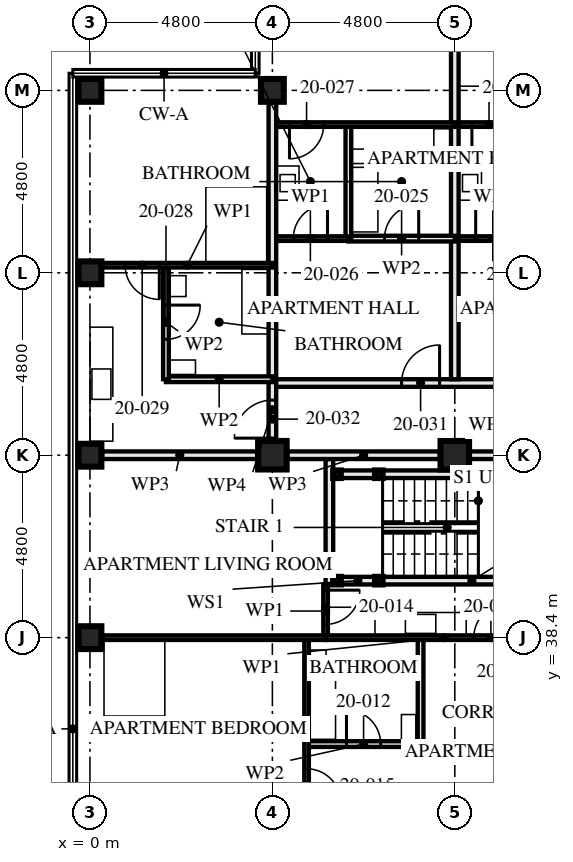
"""IFC4 building model, lengths in metres.
Left out: names, types, materials, properties, quantities, classifications, styles, units other than length and angle.
Written with IfcOpenShell. Run it as: python <this file> out.ifc"""

import sys

from ifc_helpers import new_model, si_unit, direction, frame, frame_2d, origin, origin_2d, place, context, subcontext, project, spatial, rectangle, hollow_rectangle, extrude, element, fill, save


model = new_model("IFC4")
c1 = context("Model", 3, precision=1e-05, world=origin(), true_north=direction((0.0, 1.0)))
c2 = subcontext(c1, "Body", "Model", "MODEL_VIEW")
j1 = project(units=[si_unit("LENGTHUNIT", "METRE"), si_unit("PLANEANGLEUNIT", "RADIAN")], contexts=[c1])
p1 = place(None, origin())
s1 = spatial("IfcSite", under=j1, at=p1, CompositionType="ELEMENT")
p2 = place(p1, origin())
s2 = spatial("IfcBuilding", under=s1, at=p2, CompositionType="ELEMENT")
p3 = place(p2, frame((0.0, 0.0, 76.0)))
s3 = spatial("IfcBuildingStorey", under=s2, at=p3, CompositionType="ELEMENT", Elevation=76.0)
for number, where, z_axis, x_axis in (
    (1, (0.0, 38.4, 0.0), (0.0, 0.0, 1.0), (1.0, 0.0, 0.0)),
    (2, (0.0, 43.2, 0.0), (0.0, 0.0, 1.0), (0.0, 1.0, 0.0)),
    (3, (0.0, 48.0, 0.0), (0.0, 0.0, 1.0), (1.0, 0.0, 0.0)),
    (4, (0.0, 52.8, 0.0), (0.0, 0.0, 1.0), (0.0, 1.0, 0.0)),
):
    element("IfcColumn", number, at=place(p3, frame(where, z_axis=z_axis, x_axis=x_axis)), inside=s3, PredefinedType="COLUMN", context=c2, shape_type="SweptSolid", body=[
        extrude(hollow_rectangle(XDim=0.6, YDim=0.6, WallThickness=0.08, at=origin_2d()), origin(), (0.0, 0.0, 1.0), 3.5),
    ])
p4 = place(p3, frame((4.8, 43.2, 0.0), z_axis=(0.0, 0.0, 1.0), x_axis=(0.0, 1.0, 0.0)))
e5 = element("IfcColumn", 5, at=p4, inside=s3, PredefinedType="COLUMN", context=c2, shape_type="SweptSolid", body=[
    extrude(hollow_rectangle(XDim=0.75, YDim=0.75, WallThickness=0.08, at=origin_2d()), origin(), (0.0, 0.0, 1.0), 3.5),
])
p5 = place(p3, frame((4.8, 52.8, 0.0), z_axis=(0.0, 0.0, 1.0), x_axis=(0.0, 1.0, 0.0)))
e6 = element("IfcColumn", 6, at=p5, inside=s3, PredefinedType="COLUMN", context=c2, shape_type="SweptSolid", body=[
    extrude(hollow_rectangle(XDim=0.6, YDim=0.6, WallThickness=0.08, at=origin_2d()), origin(), (0.0, 0.0, 1.0), 3.5),
])
p6 = place(p3, frame((9.6, 43.2, 0.0), z_axis=(0.0, 0.0, 1.0), x_axis=(0.0, 1.0, 0.0)))
e7 = element("IfcColumn", 7, at=p6, inside=s3, PredefinedType="COLUMN", context=c2, shape_type="SweptSolid", body=[
    extrude(hollow_rectangle(XDim=0.75, YDim=0.75, WallThickness=0.08, at=origin_2d()), origin(), (0.0, 0.0, 1.0), 3.5),
])
for number, where, z_axis, x_axis in (
    (8, (6.5, 42.7, 0.0), (0.0, 0.0, 1.0), (1.0, 0.0, 0.0)),
    (9, (6.5, 39.9, 0.0), (0.0, 0.0, 1.0), (1.0, 0.0, 0.0)),
    (10, (7.6, 42.7, 0.0), (0.0, 0.0, 1.0), (1.0, 0.0, 0.0)),
    (11, (7.6, 39.9, 0.0), (0.0, 0.0, 1.0), (1.0, 0.0, 0.0)),
):
    element("IfcColumn", number, at=place(p3, frame(where, z_axis=z_axis, x_axis=x_axis)), inside=s3, PredefinedType="COLUMN", context=c2, shape_type="SweptSolid", body=[
        extrude(hollow_rectangle(XDim=0.2, YDim=0.2, WallThickness=0.008, at=origin_2d()), origin(), (0.0, 0.0, 1.0), 3.25),
    ])
p7 = place(p3, frame((6.6, 42.7, 0.0), z_axis=(0.0, 0.0, 1.0), x_axis=(1.0, 0.0, 0.0)))
e12 = element("IfcWall", 12, at=p7, inside=s3, PredefinedType="SOLIDWALL", context=c2, shape_type="SweptSolid", body=[
    extrude(rectangle(XDim=0.9, YDim=0.2, at=frame_2d((0.45, 0.0))), origin(), (0.0, 0.0, 1.0), 2.94),
])
p8 = place(p3, frame((7.7, 42.7, 0.0), z_axis=(0.0, 0.0, 1.0), x_axis=(1.0, 0.0, 0.0)))
e13 = element("IfcWall", 13, at=p8, inside=s3, PredefinedType="SOLIDWALL", context=c2, shape_type="SweptSolid", body=[
    extrude(rectangle(XDim=4.7, YDim=0.2, at=frame_2d((2.35, 0.0))), origin(), (0.0, 0.0, 1.0), 2.94),
])
p9 = place(p3, frame((6.6, 39.9, 0.0), z_axis=(0.0, 0.0, 1.0), x_axis=(1.0, 0.0, 0.0)))
e14 = element("IfcWall", 14, at=p9, inside=s3, PredefinedType="SOLIDWALL", context=c2, shape_type="SweptSolid", body=[
    extrude(rectangle(XDim=0.9, YDim=0.2, at=frame_2d((0.45, 0.0))), origin(), (0.0, 0.0, 1.0), 2.94),
])
p10 = place(p3, frame((7.7, 39.9, 0.0), z_axis=(0.0, 0.0, 1.0), x_axis=(1.0, 0.0, 0.0)))
e15 = element("IfcWall", 15, at=p10, inside=s3, PredefinedType="SOLIDWALL", context=c2, shape_type="SweptSolid", body=[
    extrude(rectangle(XDim=4.7, YDim=0.2, at=frame_2d((2.35, 0.0))), origin(), (0.0, 0.0, 1.0), 2.94),
])
p11 = place(p3, frame((6.3, 43.1, 0.0), z_axis=(0.0, 0.0, 1.0), x_axis=(0.0, -1.0, 0.0)))
e16 = element("IfcWall", 16, at=p11, inside=s3, PredefinedType="SOLIDWALL", context=c2, shape_type="SweptSolid", body=[
    extrude(rectangle(XDim=3.3, YDim=0.2, at=frame_2d((1.65, 0.0))), origin(), (0.0, 0.0, 1.0), 3.25),
])
p12 = place(p3, frame((5.7, 35.6, 0.0), z_axis=(0.0, 0.0, 1.0), x_axis=(1.0, 0.0, 0.0)))
e17 = element("IfcWall", 17, at=p12, inside=s3, PredefinedType="PARTITIONING", context=c2, shape_type="SweptSolid", body=[
    extrude(rectangle(XDim=3.0, YDim=0.15, at=frame_2d((1.5, 0.0))), origin(), (0.0, 0.0, 1.0), 3.25),
])
p13 = place(p12, frame((1.05, 0.0, 0.0)))
e18 = element("IfcOpeningElement", 18, at=p13, cuts=e17, PredefinedType="OPENING", context=c2, shape_type="SweptSolid", body=[
    extrude(rectangle(XDim=0.9, YDim=2.1, at=frame_2d((0.45, 1.05))), frame((0.0, 0.085, 0.0), z_axis=(0.0, -1.0, 0.0), x_axis=(1.0, 0.0, 0.0)), (0.0, 0.0, 1.0), 0.171),
])
p14 = place(p3, frame((8.7, 38.4, 0.0), z_axis=(0.0, 0.0, 1.0), x_axis=(0.0, -1.0, 0.0)))
e19 = element("IfcWall", 19, at=p14, inside=s3, PredefinedType="PARTITIONING", context=c2, shape_type="SweptSolid", body=[
    extrude(rectangle(XDim=2.8, YDim=0.15, at=frame_2d((1.4, 0.0))), origin(), (0.0, 0.0, 1.0), 3.25),
])
p15 = place(p3, frame((6.2, 38.4, 0.0), z_axis=(0.0, 0.0, 1.0), x_axis=(1.0, 0.0, 0.0)))
e20 = element("IfcWall", 20, at=p15, inside=s3, PredefinedType="PARTITIONING", context=c2, shape_type="SweptSolid", body=[
    extrude(rectangle(XDim=6.25, YDim=0.12, at=frame_2d((3.125, 0.0))), origin(), (0.0, 0.0, 1.0), 2.04),
])
p16 = place(p15, frame((3.9, 0.0, 0.0)))
e21 = element("IfcOpeningElement", 21, at=p16, cuts=e20, PredefinedType="OPENING", context=c2, shape_type="SweptSolid", body=[
    extrude(rectangle(XDim=0.9, YDim=2.0, at=frame_2d((0.45, 1.0))), frame((0.0, 0.071, 0.0), z_axis=(0.0, -1.0, 0.0), x_axis=(1.0, 0.0, 0.0)), (0.0, 0.0, 1.0), 0.141),
])
p17 = place(p3, frame((6.2, 39.8, 0.0), z_axis=(0.0, 0.0, 1.0), x_axis=(0.0, -1.0, 0.0)))
e22 = element("IfcWall", 22, at=p17, inside=s3, PredefinedType="PARTITIONING", context=c2, shape_type="SweptSolid", body=[
    extrude(rectangle(XDim=1.4, YDim=0.12, at=frame_2d((0.7, 0.0))), origin(), (0.0, 0.0, 1.0), 3.25),
])
p18 = place(p17, frame((0.15, 0.0, 0.0)))
e23 = element("IfcOpeningElement", 23, at=p18, cuts=e22, PredefinedType="OPENING", context=c2, shape_type="SweptSolid", body=[
    extrude(rectangle(XDim=0.9, YDim=2.1, at=frame_2d((0.45, 1.05))), frame((0.0, 0.071, 0.0), z_axis=(0.0, -1.0, 0.0), x_axis=(1.0, 0.0, 0.0)), (0.0, 0.0, 1.0), 0.141),
])
p19 = place(p3, frame((5.7, 38.4, 0.0), z_axis=(0.0, 0.0, 1.0), x_axis=(0.0, -1.0, 0.0)))
e24 = element("IfcWall", 24, at=p19, inside=s3, PredefinedType="PARTITIONING", context=c2, shape_type="SweptSolid", body=[
    extrude(rectangle(XDim=4.8, YDim=0.12, at=frame_2d((2.4, 0.0))), origin(), (0.0, 0.0, 1.0), 3.25),
])
p20 = place(p19, frame((3.45, 0.0, 0.0)))
e25 = element("IfcOpeningElement", 25, at=p20, cuts=e24, PredefinedType="OPENING", context=c2, shape_type="SweptSolid", body=[
    extrude(rectangle(XDim=0.9, YDim=2.1, at=frame_2d((0.45, 1.05))), frame((0.0, 0.071, 0.0), z_axis=(0.0, -1.0, 0.0), x_axis=(1.0, 0.0, 0.0)), (0.0, 0.0, 1.0), 0.141),
])
p21 = place(p3, frame((0.32, 38.4, 0.0), z_axis=(0.0, 0.0, 1.0), x_axis=(1.0, 0.0, 0.0)))
e26 = element("IfcWall", 26, at=p21, inside=s3, PredefinedType="PARTITIONING", context=c2, shape_type="SweptSolid", body=[
    extrude(rectangle(XDim=5.88, YDim=0.12, at=frame_2d((2.94, 0.0))), origin(), (0.0, 0.0, 1.0), 2.04),
])
p22 = place(p3, frame((11.6, 48.9, 0.0), z_axis=(0.0, 0.0, 1.0), x_axis=(-1.0, 0.0, 0.0)))
e27 = element("IfcWall", 27, at=p22, inside=s3, PredefinedType="PARTITIONING", context=c2, shape_type="SweptSolid", body=[
    extrude(rectangle(XDim=2.0, YDim=0.12, at=frame_2d((1.0, 0.0))), origin(), (0.0, 0.0, 1.0), 3.25),
])
p23 = place(p22, frame((0.55, 0.0, 0.0)))
e28 = element("IfcOpeningElement", 28, at=p23, cuts=e27, PredefinedType="OPENING", context=c2, shape_type="SweptSolid", body=[
    extrude(rectangle(XDim=0.9, YDim=2.1, at=frame_2d((0.45, 1.05))), frame((0.0, 0.071, 0.0), z_axis=(0.0, -1.0, 0.0), x_axis=(1.0, 0.0, 0.0)), (0.0, 0.0, 1.0), 0.141),
])
p24 = place(p3, frame((14.4, 51.9, 0.0), z_axis=(0.0, 0.0, 1.0), x_axis=(-1.0, 0.0, 0.0)))
e29 = element("IfcWall", 29, at=p24, inside=s3, PredefinedType="PARTITIONING", context=c2, shape_type="SweptSolid", body=[
    extrude(rectangle(XDim=4.8, YDim=0.12, at=frame_2d((2.4, 0.0))), origin(), (0.0, 0.0, 1.0), 3.25),
])
p25 = place(p24, frame((3.45, 0.0, 0.0)))
e30 = element("IfcOpeningElement", 30, at=p25, cuts=e29, PredefinedType="OPENING", context=c2, shape_type="SweptSolid", body=[
    extrude(rectangle(XDim=0.9, YDim=2.1, at=frame_2d((0.45, 1.05))), frame((0.0, 0.071, 0.0), z_axis=(0.0, -1.0, 0.0), x_axis=(1.0, 0.0, 0.0)), (0.0, 0.0, 1.0), 0.141),
])
p26 = place(p3, frame((9.6, 57.28, 0.0), z_axis=(0.0, 0.0, 1.0), x_axis=(0.0, -1.0, 0.0)))
e31 = element("IfcWall", 31, at=p26, inside=s3, PredefinedType="PARTITIONING", context=c2, shape_type="SweptSolid", body=[
    extrude(rectangle(XDim=12.08, YDim=0.2, at=frame_2d((6.04, 0.0))), origin(), (0.0, 0.0, 1.0), 2.04),
])
p27 = place(p3, frame((6.8, 51.9, 0.0), z_axis=(0.0, 0.0, 1.0), x_axis=(0.0, -1.0, 0.0)))
e32 = element("IfcWall", 32, at=p27, inside=s3, PredefinedType="PARTITIONING", context=c2, shape_type="SweptSolid", body=[
    extrude(rectangle(XDim=3.0, YDim=0.15, at=frame_2d((1.5, 0.0))), origin(), (0.0, 0.0, 1.0), 3.25),
])
p28 = place(p3, frame((9.6, 48.9, 0.0), z_axis=(0.0, 0.0, 1.0), x_axis=(-1.0, 0.0, 0.0)))
e33 = element("IfcWall", 33, at=p28, inside=s3, PredefinedType="PARTITIONING", context=c2, shape_type="SweptSolid", body=[
    extrude(rectangle(XDim=2.8, YDim=0.15, at=frame_2d((1.4, 0.0))), origin(), (0.0, 0.0, 1.0), 3.25),
])
p29 = place(p28, frame((0.95, 0.0, 0.0)))
e34 = element("IfcOpeningElement", 34, at=p29, cuts=e33, PredefinedType="OPENING", context=c2, shape_type="SweptSolid", body=[
    extrude(rectangle(XDim=0.9, YDim=2.1, at=frame_2d((0.45, 1.05))), frame((0.0, 0.085, 0.0), z_axis=(0.0, -1.0, 0.0), x_axis=(1.0, 0.0, 0.0)), (0.0, 0.0, 1.0), 0.171),
])
p30 = place(p3, frame((6.8, 48.9, 0.0), z_axis=(0.0, 0.0, 1.0), x_axis=(-1.0, 0.0, 0.0)))
e35 = element("IfcWall", 35, at=p30, inside=s3, PredefinedType="PARTITIONING", context=c2, shape_type="SweptSolid", body=[
    extrude(rectangle(XDim=2.0, YDim=0.12, at=frame_2d((1.0, 0.0))), origin(), (0.0, 0.0, 1.0), 3.25),
])
p31 = place(p30, frame((0.55, 0.0, 0.0)))
e36 = element("IfcOpeningElement", 36, at=p31, cuts=e35, PredefinedType="OPENING", context=c2, shape_type="SweptSolid", body=[
    extrude(rectangle(XDim=0.9, YDim=2.1, at=frame_2d((0.45, 1.05))), frame((0.0, 0.071, 0.0), z_axis=(0.0, -1.0, 0.0), x_axis=(1.0, 0.0, 0.0)), (0.0, 0.0, 1.0), 0.141),
])
p32 = place(p3, frame((9.6, 51.9, 0.0), z_axis=(0.0, 0.0, 1.0), x_axis=(-1.0, 0.0, 0.0)))
e37 = element("IfcWall", 37, at=p32, inside=s3, PredefinedType="PARTITIONING", context=c2, shape_type="SweptSolid", body=[
    extrude(rectangle(XDim=4.8, YDim=0.12, at=frame_2d((2.4, 0.0))), origin(), (0.0, 0.0, 1.0), 3.25),
])
p33 = place(p32, frame((3.45, 0.0, 0.0)))
e38 = element("IfcOpeningElement", 38, at=p33, cuts=e37, PredefinedType="OPENING", context=c2, shape_type="SweptSolid", body=[
    extrude(rectangle(XDim=0.9, YDim=2.1, at=frame_2d((0.45, 1.05))), frame((0.0, 0.071, 0.0), z_axis=(0.0, -1.0, 0.0), x_axis=(1.0, 0.0, 0.0)), (0.0, 0.0, 1.0), 0.141),
])
p34 = place(p3, frame((4.8, 52.48, 0.0), z_axis=(0.0, 0.0, 1.0), x_axis=(0.0, -1.0, 0.0)))
e39 = element("IfcWall", 39, at=p34, inside=s3, PredefinedType="PARTITIONING", context=c2, shape_type="SweptSolid", body=[
    extrude(rectangle(XDim=7.28, YDim=0.2, at=frame_2d((3.64, 0.0))), origin(), (0.0, 0.0, 1.0), 2.04),
])
p35 = place(p3, frame((2.0, 48.2, 0.0), z_axis=(0.0, 0.0, 1.0), x_axis=(0.0, -1.0, 0.0)))
e40 = element("IfcWall", 40, at=p35, inside=s3, PredefinedType="PARTITIONING", context=c2, shape_type="SweptSolid", body=[
    extrude(rectangle(XDim=3.0, YDim=0.15, at=frame_2d((1.5, 0.0))), origin(), (0.0, 0.0, 1.0), 2.04),
])
p36 = place(p35, frame((1.05, 0.0, 0.0)))
e41 = element("IfcOpeningElement", 41, at=p36, cuts=e40, PredefinedType="OPENING", context=c2, shape_type="SweptSolid", body=[
    extrude(rectangle(XDim=0.9, YDim=2.0, at=frame_2d((0.45, 1.0))), frame((0.0, 0.085, 0.0), z_axis=(0.0, -1.0, 0.0), x_axis=(1.0, 0.0, 0.0)), (0.0, 0.0, 1.0), 0.171),
])
p37 = place(p3, frame((4.8, 45.2, 0.0), z_axis=(0.0, 0.0, 1.0), x_axis=(-1.0, 0.0, 0.0)))
e42 = element("IfcWall", 42, at=p37, inside=s3, PredefinedType="PARTITIONING", context=c2, shape_type="SweptSolid", body=[
    extrude(rectangle(XDim=2.8, YDim=0.15, at=frame_2d((1.4, 0.0))), origin(), (0.0, 0.0, 1.0), 3.25),
])
p38 = place(p3, frame((4.8, 48.2, 0.0), z_axis=(0.0, 0.0, 1.0), x_axis=(-1.0, 0.0, 0.0)))
e43 = element("IfcWall", 43, at=p38, inside=s3, PredefinedType="PARTITIONING", context=c2, shape_type="SweptSolid", body=[
    extrude(rectangle(XDim=4.48, YDim=0.12, at=frame_2d((2.24, 0.0))), origin(), (0.0, 0.0, 1.0), 2.04),
])
p39 = place(p38, frame((2.975, 0.0, 0.0)))
e44 = element("IfcOpeningElement", 44, at=p39, cuts=e43, PredefinedType="OPENING", context=c2, shape_type="SweptSolid", body=[
    extrude(rectangle(XDim=0.9, YDim=2.0, at=frame_2d((0.45, 1.0))), frame((0.0, 0.071, 0.0), z_axis=(0.0, -1.0, 0.0), x_axis=(1.0, 0.0, 0.0)), (0.0, 0.0, 1.0), 0.141),
])
p40 = place(p3, frame((14.4, 45.1, 0.0), z_axis=(0.0, 0.0, 1.0), x_axis=(-1.0, 0.0, 0.0)))
e45 = element("IfcWall", 45, at=p40, inside=s3, PredefinedType="PARTITIONING", context=c2, shape_type="SweptSolid", body=[
    extrude(rectangle(XDim=9.6, YDim=0.2, at=frame_2d((4.8, 0.0))), origin(), (0.0, 0.0, 1.0), 3.25),
])
p41 = place(p40, frame((0.4, 0.0, 0.0)))
e46 = element("IfcOpeningElement", 46, at=p41, cuts=e45, PredefinedType="OPENING", context=c2, shape_type="SweptSolid", body=[
    extrude(rectangle(XDim=1.0, YDim=2.1, at=frame_2d((0.5, 1.05))), frame((0.0, 0.111, 0.0), z_axis=(0.0, -1.0, 0.0), x_axis=(1.0, 0.0, 0.0)), (0.0, 0.0, 1.0), 0.221),
])
p42 = place(p40, frame((5.2, 0.0, 0.0)))
e47 = element("IfcOpeningElement", 47, at=p42, cuts=e45, PredefinedType="OPENING", context=c2, shape_type="SweptSolid", body=[
    extrude(rectangle(XDim=1.0, YDim=2.1, at=frame_2d((0.5, 1.05))), frame((0.0, 0.111, 0.0), z_axis=(0.0, -1.0, 0.0), x_axis=(1.0, 0.0, 0.0)), (0.0, 0.0, 1.0), 0.221),
])
p43 = place(p3, frame((4.8, 45.2, 0.0), z_axis=(0.0, 0.0, 1.0), x_axis=(0.0, -1.0, 0.0)))
e48 = element("IfcWall", 48, at=p43, inside=s3, PredefinedType="PARTITIONING", context=c2, shape_type="SweptSolid", body=[
    extrude(rectangle(XDim=1.605, YDim=0.2, at=frame_2d((0.802, 0.0))), origin(), (0.0, 0.0, 1.0), 3.25),
])
p44 = place(p43, frame((0.55, 0.0, 0.0)))
e49 = element("IfcOpeningElement", 49, at=p44, cuts=e48, PredefinedType="OPENING", context=c2, shape_type="SweptSolid", body=[
    extrude(rectangle(XDim=1.0, YDim=2.1, at=frame_2d((0.5, 1.05))), frame((0.0, 0.111, 0.0), z_axis=(0.0, -1.0, 0.0), x_axis=(1.0, 0.0, 0.0)), (0.0, 0.0, 1.0), 0.221),
])
p45 = place(p3, frame((12.5, 43.2, 0.0), z_axis=(0.0, 0.0, 1.0), x_axis=(-1.0, 0.0, 0.0)))
e50 = element("IfcWall", 50, at=p45, inside=s3, PredefinedType="PARTITIONING", context=c2, shape_type="SweptSolid", body=[
    extrude(rectangle(XDim=2.505, YDim=0.2, at=frame_2d((1.252, 0.0))), origin(), (0.0, 0.0, 1.0), 2.04),
])
p46 = place(p3, frame((9.205, 43.2, 0.0), z_axis=(0.0, 0.0, 1.0), x_axis=(-1.0, 0.0, 0.0)))
e51 = element("IfcWall", 51, at=p46, inside=s3, PredefinedType="PARTITIONING", context=c2, shape_type="SweptSolid", body=[
    extrude(rectangle(XDim=4.01, YDim=0.2, at=frame_2d((2.005, 0.0))), origin(), (0.0, 0.0, 1.0), 2.04),
])
p47 = place(p3, frame((4.405, 43.2, 0.0), z_axis=(0.0, 0.0, 1.0), x_axis=(-1.0, 0.0, 0.0)))
e52 = element("IfcWall", 52, at=p47, inside=s3, PredefinedType="PARTITIONING", context=c2, shape_type="SweptSolid", body=[
    extrude(rectangle(XDim=4.085, YDim=0.2, at=frame_2d((2.042, 0.0))), origin(), (0.0, 0.0, 1.0), 2.04),
])
p48 = place(p13, origin())
e53 = element("IfcDoor", 53, at=p48, inside=s3, OperationType="SINGLE_SWING_RIGHT", PredefinedType="DOOR", context=c2, shape_type="SweptSolid", body=[
    extrude(rectangle(XDim=0.9, YDim=2.1, at=frame_2d((0.45, 1.05))), frame((0.0, 0.022, 0.0), z_axis=(0.0, -1.0, 0.0), x_axis=(1.0, 0.0, 0.0)), (0.0, 0.0, 1.0), 0.044),
])
fill(e18, e53)
p49 = place(p16, origin())
e54 = element("IfcDoor", 54, at=p49, inside=s3, OperationType="SINGLE_SWING_LEFT", PredefinedType="DOOR", context=c2, shape_type="SweptSolid", body=[
    extrude(rectangle(XDim=0.9, YDim=2.0, at=frame_2d((0.45, 1.0))), frame((0.0, 0.022, 0.0), z_axis=(0.0, -1.0, 0.0), x_axis=(1.0, 0.0, 0.0)), (0.0, 0.0, 1.0), 0.044),
])
fill(e21, e54)
p50 = place(p18, origin())
e55 = element("IfcDoor", 55, at=p50, inside=s3, OperationType="SINGLE_SWING_RIGHT", PredefinedType="DOOR", context=c2, shape_type="SweptSolid", body=[
    extrude(rectangle(XDim=0.9, YDim=2.1, at=frame_2d((0.45, 1.05))), frame((0.0, 0.022, 0.0), z_axis=(0.0, -1.0, 0.0), x_axis=(1.0, 0.0, 0.0)), (0.0, 0.0, 1.0), 0.044),
])
fill(e23, e55)
p51 = place(p20, origin())
e56 = element("IfcDoor", 56, at=p51, inside=s3, OperationType="SINGLE_SWING_LEFT", PredefinedType="DOOR", context=c2, shape_type="SweptSolid", body=[
    extrude(rectangle(XDim=0.9, YDim=2.1, at=frame_2d((0.45, 1.05))), frame((0.0, 0.022, 0.0), z_axis=(0.0, -1.0, 0.0), x_axis=(1.0, 0.0, 0.0)), (0.0, 0.0, 1.0), 0.044),
])
fill(e25, e56)
p52 = place(p23, frame((0.9, 0.0, 0.0), z_axis=(0.0, 0.0, 1.0), x_axis=(-1.0, 0.0, 0.0)))
e57 = element("IfcDoor", 57, at=p52, inside=s3, OperationType="SINGLE_SWING_RIGHT", PredefinedType="DOOR", context=c2, shape_type="SweptSolid", body=[
    extrude(rectangle(XDim=0.9, YDim=2.1, at=frame_2d((0.45, 1.05))), frame((0.0, 0.022, 0.0), z_axis=(0.0, -1.0, 0.0), x_axis=(1.0, 0.0, 0.0)), (0.0, 0.0, 1.0), 0.044),
])
fill(e28, e57)
p53 = place(p25, origin())
e58 = element("IfcDoor", 58, at=p53, inside=s3, OperationType="SINGLE_SWING_LEFT", PredefinedType="DOOR", context=c2, shape_type="SweptSolid", body=[
    extrude(rectangle(XDim=0.9, YDim=2.1, at=frame_2d((0.45, 1.05))), frame((0.0, 0.022, 0.0), z_axis=(0.0, -1.0, 0.0), x_axis=(1.0, 0.0, 0.0)), (0.0, 0.0, 1.0), 0.044),
])
fill(e30, e58)
p54 = place(p29, frame((0.9, 0.0, 0.0), z_axis=(0.0, 0.0, 1.0), x_axis=(-1.0, 0.0, 0.0)))
e59 = element("IfcDoor", 59, at=p54, inside=s3, OperationType="SINGLE_SWING_LEFT", PredefinedType="DOOR", context=c2, shape_type="SweptSolid", body=[
    extrude(rectangle(XDim=0.9, YDim=2.1, at=frame_2d((0.45, 1.05))), frame((0.0, 0.022, 0.0), z_axis=(0.0, -1.0, 0.0), x_axis=(1.0, 0.0, 0.0)), (0.0, 0.0, 1.0), 0.044),
])
fill(e34, e59)
p55 = place(p31, frame((0.9, 0.0, 0.0), z_axis=(0.0, 0.0, 1.0), x_axis=(-1.0, 0.0, 0.0)))
e60 = element("IfcDoor", 60, at=p55, inside=s3, OperationType="SINGLE_SWING_LEFT", PredefinedType="DOOR", context=c2, shape_type="SweptSolid", body=[
    extrude(rectangle(XDim=0.9, YDim=2.1, at=frame_2d((0.45, 1.05))), frame((0.0, 0.022, 0.0), z_axis=(0.0, -1.0, 0.0), x_axis=(1.0, 0.0, 0.0)), (0.0, 0.0, 1.0), 0.044),
])
fill(e36, e60)
p56 = place(p33, origin())
e61 = element("IfcDoor", 61, at=p56, inside=s3, OperationType="SINGLE_SWING_LEFT", PredefinedType="DOOR", context=c2, shape_type="SweptSolid", body=[
    extrude(rectangle(XDim=0.9, YDim=2.1, at=frame_2d((0.45, 1.05))), frame((0.0, 0.022, 0.0), z_axis=(0.0, -1.0, 0.0), x_axis=(1.0, 0.0, 0.0)), (0.0, 0.0, 1.0), 0.044),
])
fill(e38, e61)
p57 = place(p36, origin())
e62 = element("IfcDoor", 62, at=p57, inside=s3, OperationType="SINGLE_SWING_RIGHT", PredefinedType="DOOR", context=c2, shape_type="SweptSolid", body=[
    extrude(rectangle(XDim=0.9, YDim=2.0, at=frame_2d((0.45, 1.0))), frame((0.0, 0.022, 0.0), z_axis=(0.0, -1.0, 0.0), x_axis=(1.0, 0.0, 0.0)), (0.0, 0.0, 1.0), 0.044),
])
fill(e41, e62)
p58 = place(p39, origin())
e63 = element("IfcDoor", 63, at=p58, inside=s3, OperationType="SINGLE_SWING_RIGHT", PredefinedType="DOOR", context=c2, shape_type="SweptSolid", body=[
    extrude(rectangle(XDim=0.9, YDim=2.0, at=frame_2d((0.45, 1.0))), frame((0.0, 0.022, 0.0), z_axis=(0.0, -1.0, 0.0), x_axis=(1.0, 0.0, 0.0)), (0.0, 0.0, 1.0), 0.044),
])
fill(e44, e63)
p59 = place(p42, frame((1.0, 0.0, 0.0), z_axis=(0.0, 0.0, 1.0), x_axis=(-1.0, 0.0, 0.0)))
e64 = element("IfcDoor", 64, at=p59, inside=s3, OperationType="SINGLE_SWING_LEFT", PredefinedType="DOOR", context=c2, shape_type="SweptSolid", body=[
    extrude(rectangle(XDim=1.0, YDim=2.1, at=frame_2d((0.5, 1.05))), frame((0.0, 0.027, 0.0), z_axis=(0.0, -1.0, 0.0), x_axis=(1.0, 0.0, 0.0)), (0.0, 0.0, 1.0), 0.054),
])
fill(e47, e64)
p60 = place(p44, frame((1.0, 0.0, 0.0), z_axis=(0.0, 0.0, 1.0), x_axis=(-1.0, 0.0, 0.0)))
e65 = element("IfcDoor", 65, at=p60, inside=s3, OperationType="SINGLE_SWING_RIGHT", PredefinedType="DOOR", context=c2, shape_type="SweptSolid", body=[
    extrude(rectangle(XDim=1.0, YDim=2.1, at=frame_2d((0.5, 1.05))), frame((0.0, 0.027, 0.0), z_axis=(0.0, -1.0, 0.0), x_axis=(1.0, 0.0, 0.0)), (0.0, 0.0, 1.0), 0.054),
])
fill(e49, e65)
save(model, sys.argv[1])
